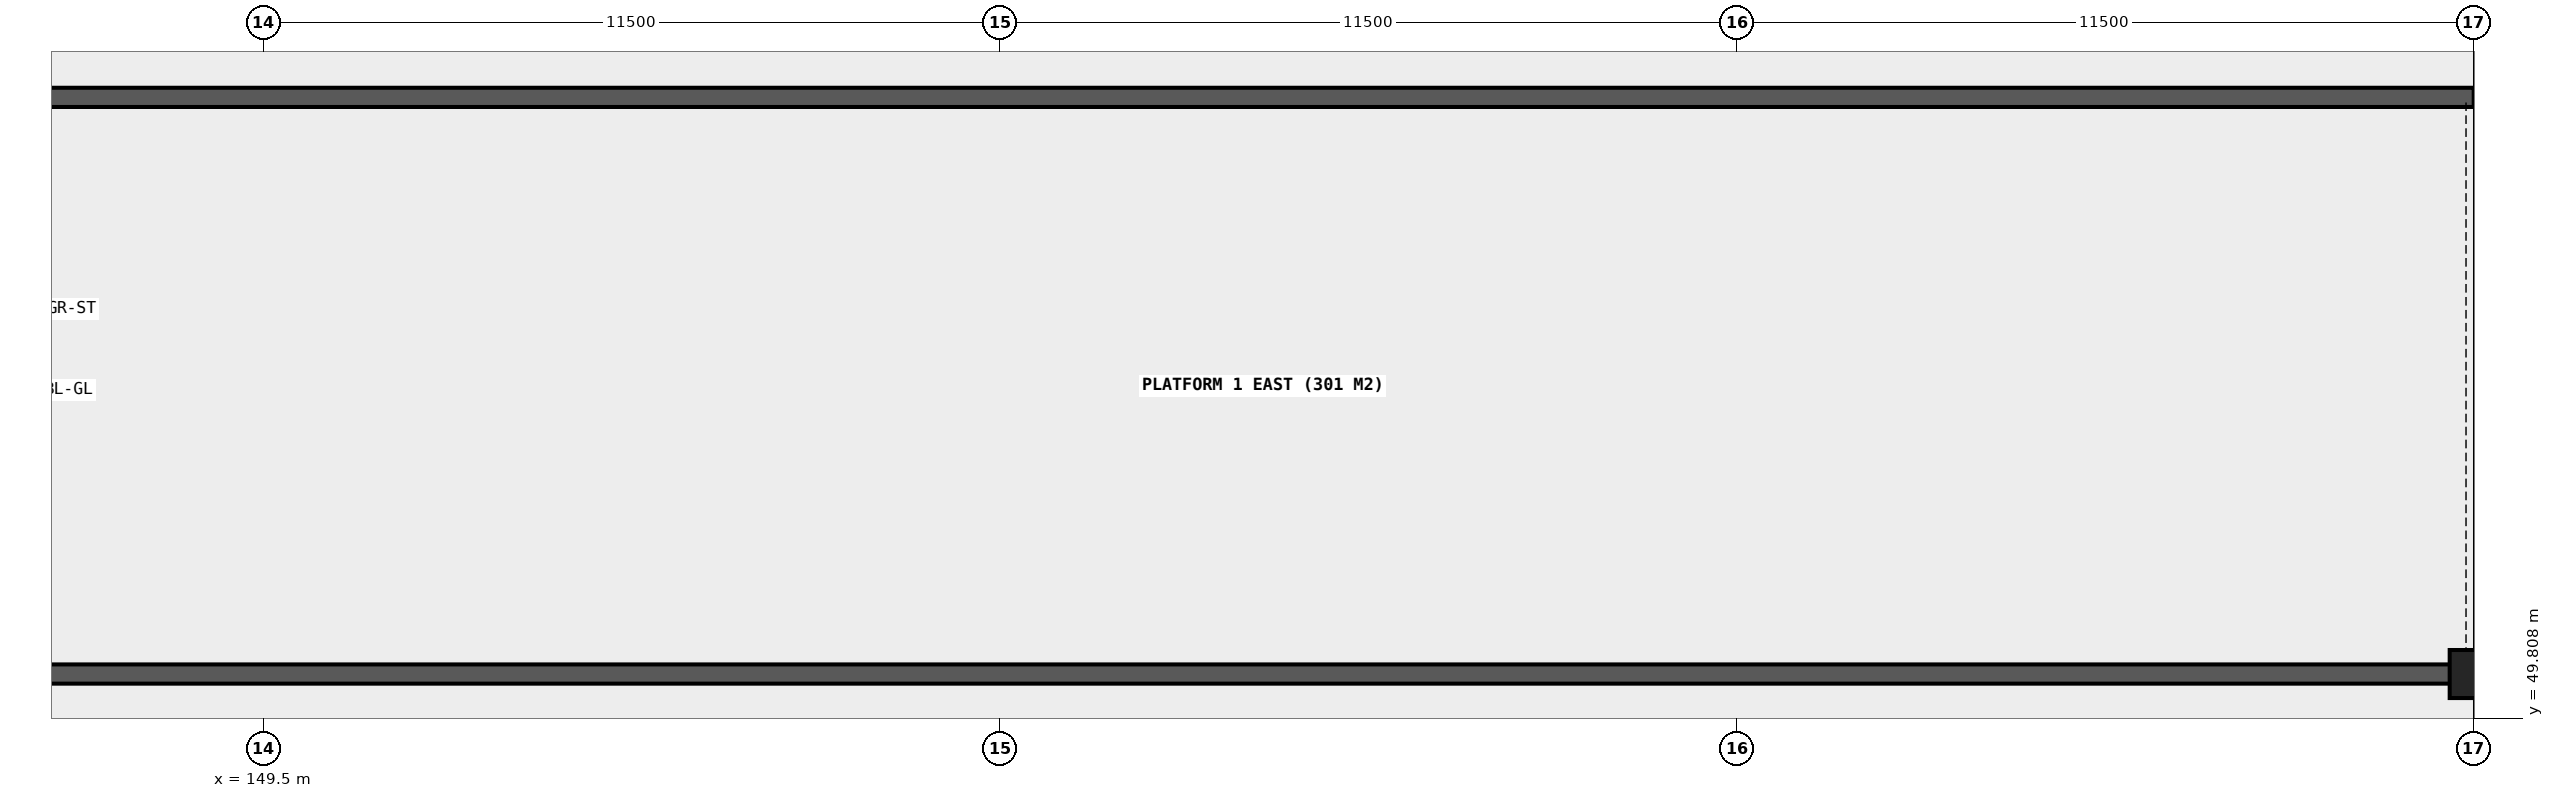
"""IFC4 building model, lengths in metres.
Left out: names, types, materials, properties, quantities, classifications, styles, units other than length and angle.
Written with IfcOpenShell. Run it as: python <this file> out.ifc"""

import sys

from ifc_helpers import new_model, si_unit, direction, frame, frame_2d, origin, origin_2d, place, context, subcontext, project, spatial, rectangle, extrude, element, save


model = new_model("IFC4")
c1 = context("Model", 3, precision=1e-05, world=origin(), true_north=direction((0.0, 1.0)))
c2 = subcontext(c1, "Body", "Model", "MODEL_VIEW")
j1 = project(units=[si_unit("LENGTHUNIT", "METRE"), si_unit("PLANEANGLEUNIT", "RADIAN")], contexts=[c1])
p1 = place(None, origin())
s1 = spatial("IfcSite", under=j1, at=p1, CompositionType="ELEMENT")
p2 = place(p1, origin())
s2 = spatial("IfcBuilding", under=s1, at=p2, CompositionType="ELEMENT")
p3 = place(p2, origin())
s3 = spatial("IfcBuildingStorey", under=s2, at=p3, CompositionType="ELEMENT", Elevation=0.0)
for number, where, z_axis, x_axis in (
    (1, (0.0, 50.5, -0.32), (0.0, 0.0, 1.0), (1.0, 0.0, 0.0)),
    (2, (0.0, 59.5, -0.32), (0.0, 0.0, 1.0), (1.0, 0.0, 0.0)),
):
    element("IfcWall", number, at=place(p3, frame(where, z_axis=z_axis, x_axis=x_axis)), inside=s3, PredefinedType="SHEAR", context=c2, shape_type="SweptSolid", body=[
        extrude(rectangle(XDim=184.0, YDim=0.3, at=frame_2d((92.0, 0.0))), origin(), (0.0, 0.0, 1.0), 1.27),
    ])
p4 = place(p3, frame((184.0, 50.5, 0.55), z_axis=(0.0, 0.0, 1.0), x_axis=(1.0, 0.0, 0.0)))
e3 = element("IfcColumn", 3, at=p4, inside=s3, PredefinedType="COLUMN", context=c2, shape_type="SweptSolid", body=[
    extrude(rectangle(XDim=0.75, YDim=0.75, at=origin_2d()), origin(), (0.0, 0.0, 1.0), 3.65),
])
save(model, sys.argv[1])
